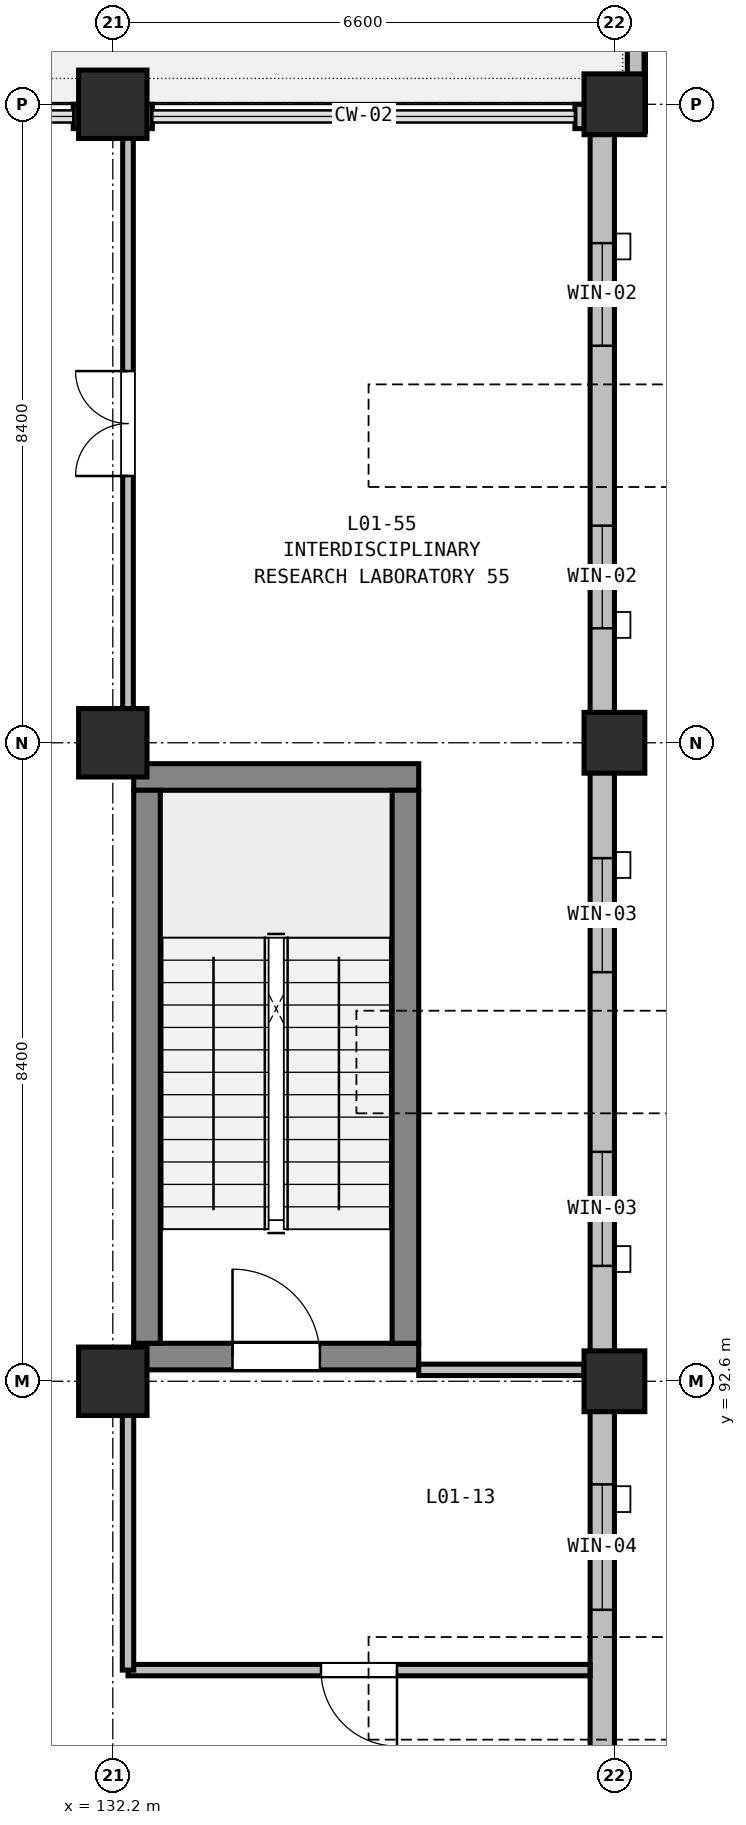
"""IFC4 building model, lengths in metres.
Left out: names, types, materials, properties, quantities, classifications, styles, units other than length and angle.
Written with IfcOpenShell. Run it as: python <this file> out.ifc"""

import sys

from ifc_helpers import new_model, si_unit, direction, frame, frame_2d, origin, origin_2d, place, context, subcontext, project, spatial, rectangle, extrude, element, fill, save


model = new_model("IFC4")
c1 = context("Model", 3, precision=1e-05, world=origin(), true_north=direction((0.0, 1.0)))
c2 = subcontext(c1, "Body", "Model", "MODEL_VIEW")
j1 = project(units=[si_unit("LENGTHUNIT", "METRE"), si_unit("PLANEANGLEUNIT", "RADIAN")], contexts=[c1])
p1 = place(None, origin())
s1 = spatial("IfcSite", under=j1, at=p1, CompositionType="ELEMENT")
p2 = place(p1, origin())
s2 = spatial("IfcBuilding", under=s1, at=p2, CompositionType="ELEMENT")
p3 = place(p2, frame((0.0, 0.0, 5.4)))
s3 = spatial("IfcBuildingStorey", under=s2, at=p3, CompositionType="ELEMENT", Elevation=5.4)
for number, where, z_axis, x_axis in (
    (1, (132.2, 92.6, 0.0), (0.0, 0.0, 1.0), (1.0, 0.0, 0.0)),
    (2, (132.2, 101.0, 0.0), (0.0, 0.0, 1.0), (1.0, 0.0, 0.0)),
    (3, (132.2, 109.4, 0.0), (0.0, 0.0, 1.0), (1.0, 0.0, 0.0)),
):
    element("IfcColumn", number, at=place(p3, frame(where, z_axis=z_axis, x_axis=x_axis)), inside=s3, PredefinedType="COLUMN", context=c2, shape_type="SweptSolid", body=[
        extrude(rectangle(XDim=0.9, YDim=0.9, at=origin_2d()), origin(), (0.0, 0.0, 1.0), 4.8),
    ])
for number, where, z_axis, x_axis in (
    (4, (138.8, 92.6, 0.0), (0.0, 0.0, 1.0), (1.0, 0.0, 0.0)),
    (5, (138.8, 101.0, 0.0), (0.0, 0.0, 1.0), (1.0, 0.0, 0.0)),
    (6, (138.8, 109.4, 0.0), (0.0, 0.0, 1.0), (1.0, 0.0, 0.0)),
):
    element("IfcColumn", number, at=place(p3, frame(where, z_axis=z_axis, x_axis=x_axis)), inside=s3, PredefinedType="COLUMN", context=c2, shape_type="SweptSolid", body=[
        extrude(rectangle(XDim=0.8, YDim=0.8, at=origin_2d()), origin(), (0.0, 0.0, 1.0), 4.8),
    ])
p4 = place(p3, frame((132.475, 92.925, 0.0), z_axis=(0.0, 0.0, 1.0), x_axis=(1.0, 0.0, 0.0)))
e7 = element("IfcWall", 7, at=p4, inside=s3, PredefinedType="SHEAR", context=c2, shape_type="SweptSolid", body=[
    extrude(rectangle(XDim=3.75, YDim=0.35, at=frame_2d((1.875, 0.0))), origin(), (0.0, 0.0, 1.0), 4.8),
])
p5 = place(p4, frame((1.3, 0.0, 0.0)))
e8 = element("IfcOpeningElement", 8, at=p5, cuts=e7, PredefinedType="OPENING", context=c2, shape_type="SweptSolid", body=[
    extrude(rectangle(XDim=1.15, YDim=2.15, at=frame_2d((0.575, 1.075))), frame((0.0, 0.185, 0.0), z_axis=(0.0, -1.0, 0.0), x_axis=(1.0, 0.0, 0.0)), (0.0, 0.0, 1.0), 0.37),
])
p6 = place(p3, frame((132.475, 100.55, 0.0), z_axis=(0.0, 0.0, 1.0), x_axis=(1.0, 0.0, 0.0)))
e9 = element("IfcWall", 9, at=p6, inside=s3, PredefinedType="SHEAR", context=c2, shape_type="SweptSolid", body=[
    extrude(rectangle(XDim=3.75, YDim=0.35, at=frame_2d((1.875, 0.0))), origin(), (0.0, 0.0, 1.0), 4.8),
])
for number, where, z_axis, x_axis in (
    (10, (132.65, 93.1, 0.0), (0.0, 0.0, 1.0), (0.0, 1.0, 0.0)),
    (11, (136.05, 93.1, 0.0), (0.0, 0.0, 1.0), (0.0, 1.0, 0.0)),
):
    element("IfcWall", number, at=place(p3, frame(where, z_axis=z_axis, x_axis=x_axis)), inside=s3, PredefinedType="SHEAR", context=c2, shape_type="SweptSolid", body=[
        extrude(rectangle(XDim=7.275, YDim=0.35, at=frame_2d((3.637, 0.0))), origin(), (0.0, 0.0, 1.0), 4.8),
    ])
for number, where, z_axis, x_axis in (
    (12, (131.68, 109.24, 0.0), (0.0, 0.0, 1.0), (1.0, 0.0, 0.0)),
    (13, (132.2, 109.24, 0.0), (0.0, 0.0, 1.0), (1.0, 0.0, 0.0)),
    (14, (138.28, 109.24, 0.0), (0.0, 0.0, 1.0), (1.0, 0.0, 0.0)),
):
    element("IfcWall", number, at=place(p3, frame(where, z_axis=z_axis, x_axis=x_axis)), inside=s3, PredefinedType="STANDARD", context=c2, shape_type="SweptSolid", body=[
        extrude(rectangle(XDim=0.52, YDim=0.32, at=frame_2d((0.26, 0.0))), origin(), (0.0, 0.0, 1.0), 3.385),
    ])
p7 = place(p3, frame((138.64, 109.08, 0.0), z_axis=(0.0, 0.0, 1.0), x_axis=(0.0, -1.0, 0.0)))
e15 = element("IfcWall", 15, at=p7, inside=s3, PredefinedType="STANDARD", context=c2, shape_type="SweptSolid", body=[
    extrude(rectangle(XDim=8.08, YDim=0.32, at=frame_2d((4.04, 0.0))), origin(), (0.0, 0.0, 1.0), 4.085),
])
p8 = place(p7, frame((1.507, 0.0, 0.9)))
e16 = element("IfcOpeningElement", 16, at=p8, cuts=e15, PredefinedType="OPENING", context=c2, shape_type="SweptSolid", body=[
    extrude(rectangle(XDim=1.35, YDim=2.1, at=frame_2d((0.675, 1.05))), frame((0.0, 0.17, 0.0), z_axis=(0.0, -1.0, 0.0), x_axis=(1.0, 0.0, 0.0)), (0.0, 0.0, 1.0), 0.34),
])
p9 = place(p7, frame((5.223, 0.0, 0.9)))
e17 = element("IfcOpeningElement", 17, at=p9, cuts=e15, PredefinedType="OPENING", context=c2, shape_type="SweptSolid", body=[
    extrude(rectangle(XDim=1.35, YDim=2.1, at=frame_2d((0.675, 1.05))), frame((0.0, 0.17, 0.0), z_axis=(0.0, -1.0, 0.0), x_axis=(1.0, 0.0, 0.0)), (0.0, 0.0, 1.0), 0.34),
])
p10 = place(p3, frame((138.64, 101.0, 0.0), z_axis=(0.0, 0.0, 1.0), x_axis=(0.0, -1.0, 0.0)))
e18 = element("IfcWall", 18, at=p10, inside=s3, PredefinedType="STANDARD", context=c2, shape_type="SweptSolid", body=[
    extrude(rectangle(XDim=8.4, YDim=0.32, at=frame_2d((4.2, 0.0))), origin(), (0.0, 0.0, 1.0), 4.085),
])
p11 = place(p10, frame((1.518, 0.0, 0.9)))
e19 = element("IfcOpeningElement", 19, at=p11, cuts=e18, PredefinedType="OPENING", context=c2, shape_type="SweptSolid", body=[
    extrude(rectangle(XDim=1.5, YDim=2.1, at=frame_2d((0.75, 1.05))), frame((0.0, 0.17, 0.0), z_axis=(0.0, -1.0, 0.0), x_axis=(1.0, 0.0, 0.0)), (0.0, 0.0, 1.0), 0.34),
])
p12 = place(p10, frame((5.382, 0.0, 0.9)))
e20 = element("IfcOpeningElement", 20, at=p12, cuts=e18, PredefinedType="OPENING", context=c2, shape_type="SweptSolid", body=[
    extrude(rectangle(XDim=1.5, YDim=2.1, at=frame_2d((0.75, 1.05))), frame((0.0, 0.17, 0.0), z_axis=(0.0, -1.0, 0.0), x_axis=(1.0, 0.0, 0.0)), (0.0, 0.0, 1.0), 0.34),
])
p13 = place(p3, frame((138.64, 92.6, 0.0), z_axis=(0.0, 0.0, 1.0), x_axis=(0.0, -1.0, 0.0)))
e21 = element("IfcWall", 21, at=p13, inside=s3, PredefinedType="STANDARD", context=c2, shape_type="SweptSolid", body=[
    extrude(rectangle(XDim=8.08, YDim=0.32, at=frame_2d((4.04, 0.0))), origin(), (0.0, 0.0, 1.0), 4.085),
])
p14 = place(p13, frame((1.357, 0.0, 0.9)))
e22 = element("IfcOpeningElement", 22, at=p14, cuts=e21, PredefinedType="OPENING", context=c2, shape_type="SweptSolid", body=[
    extrude(rectangle(XDim=1.65, YDim=2.1, at=frame_2d((0.825, 1.05))), frame((0.0, 0.17, 0.0), z_axis=(0.0, -1.0, 0.0), x_axis=(1.0, 0.0, 0.0)), (0.0, 0.0, 1.0), 0.34),
])
p15 = place(p13, frame((5.073, 0.0, 0.9)))
e23 = element("IfcOpeningElement", 23, at=p15, cuts=e21, PredefinedType="OPENING", context=c2, shape_type="SweptSolid", body=[
    extrude(rectangle(XDim=1.65, YDim=2.1, at=frame_2d((0.825, 1.05))), frame((0.0, 0.17, 0.0), z_axis=(0.0, -1.0, 0.0), x_axis=(1.0, 0.0, 0.0)), (0.0, 0.0, 1.0), 0.34),
])
p16 = place(p3, frame((139.08, 118.28, 0.0), z_axis=(0.0, 0.0, 1.0), x_axis=(0.0, -1.0, 0.0)))
e24 = element("IfcWall", 24, at=p16, inside=s3, PredefinedType="PARAPET", context=c2, shape_type="SweptSolid", body=[
    extrude(rectangle(XDim=9.11, YDim=0.22, at=frame_2d((4.555, 0.0))), origin(), (0.0, 0.0, 1.0), 0.68),
])
p17 = place(p3, frame((136.225, 92.75, 0.0), z_axis=(0.0, 0.0, 1.0), x_axis=(1.0, 0.0, 0.0)))
e25 = element("IfcWall", 25, at=p17, inside=s3, PredefinedType="PARTITIONING", context=c2, shape_type="SweptSolid", body=[
    extrude(rectangle(XDim=2.175, YDim=0.15, at=frame_2d((1.087, 0.0))), origin(), (0.0, 0.0, 1.0), 4.135),
])
p18 = place(p3, frame((138.478, 88.8, 0.0), z_axis=(0.0, 0.0, 1.0), x_axis=(-1.0, 0.0, 0.0)))
e26 = element("IfcWall", 26, at=p18, inside=s3, PredefinedType="PARTITIONING", context=c2, shape_type="SweptSolid", body=[
    extrude(rectangle(XDim=6.078, YDim=0.15, at=frame_2d((3.039, 0.0))), origin(), (0.0, 0.0, 1.0), 3.935),
])
p19 = place(p18, frame((2.539, 0.0, 0.0)))
e27 = element("IfcOpeningElement", 27, at=p19, cuts=e26, PredefinedType="OPENING", context=c2, shape_type="SweptSolid", body=[
    extrude(rectangle(XDim=1.0, YDim=2.1, at=frame_2d((0.5, 1.05))), frame((0.0, 0.085, 0.0), z_axis=(0.0, -1.0, 0.0), x_axis=(1.0, 0.0, 0.0)), (0.0, 0.0, 1.0), 0.17),
])
p20 = place(p3, frame((132.4, 88.8, 0.0), z_axis=(0.0, 0.0, 1.0), x_axis=(0.0, 1.0, 0.0)))
e28 = element("IfcWall", 28, at=p20, inside=s3, PredefinedType="PARTITIONING", context=c2, shape_type="SweptSolid", body=[
    extrude(rectangle(XDim=3.35, YDim=0.15, at=frame_2d((1.675, 0.0))), origin(), (0.0, 0.0, 1.0), 3.935),
])
p21 = place(p3, frame((132.4, 101.45, 0.0), z_axis=(0.0, 0.0, 1.0), x_axis=(0.0, 1.0, 0.0)))
e29 = element("IfcWall", 29, at=p21, inside=s3, PredefinedType="PARTITIONING", context=c2, shape_type="SweptSolid", body=[
    extrude(rectangle(XDim=7.5, YDim=0.14, at=frame_2d((3.75, 0.0))), origin(), (0.0, 0.0, 1.0), 3.935),
])
p22 = place(p21, frame((3.06, 0.0, 0.0)))
e30 = element("IfcOpeningElement", 30, at=p22, cuts=e29, PredefinedType="OPENING", context=c2, shape_type="SweptSolid", body=[
    extrude(rectangle(XDim=1.38, YDim=2.2, at=frame_2d((0.69, 1.1))), frame((0.0, 0.08, 0.0), z_axis=(0.0, -1.0, 0.0), x_axis=(1.0, 0.0, 0.0)), (0.0, 0.0, 1.0), 0.16),
])
p23 = place(p8, origin())
e31 = element("IfcWindow", 31, at=p23, inside=s3, PartitioningType="SINGLE_PANEL", PredefinedType="WINDOW", context=c2, shape_type="SweptSolid", body=[
    extrude(rectangle(XDim=1.35, YDim=2.1, at=frame_2d((0.675, 1.05))), frame((0.0, 0.03, 0.0), z_axis=(0.0, -1.0, 0.0), x_axis=(1.0, 0.0, 0.0)), (0.0, 0.0, 1.0), 0.06),
])
fill(e16, e31)
p24 = place(p9, origin())
e32 = element("IfcWindow", 32, at=p24, inside=s3, PartitioningType="SINGLE_PANEL", PredefinedType="WINDOW", context=c2, shape_type="SweptSolid", body=[
    extrude(rectangle(XDim=1.35, YDim=2.1, at=frame_2d((0.675, 1.05))), frame((0.0, 0.03, 0.0), z_axis=(0.0, -1.0, 0.0), x_axis=(1.0, 0.0, 0.0)), (0.0, 0.0, 1.0), 0.06),
])
fill(e17, e32)
p25 = place(p11, origin())
e33 = element("IfcWindow", 33, at=p25, inside=s3, PartitioningType="SINGLE_PANEL", PredefinedType="WINDOW", context=c2, shape_type="SweptSolid", body=[
    extrude(rectangle(XDim=1.5, YDim=2.1, at=frame_2d((0.75, 1.05))), frame((0.0, 0.03, 0.0), z_axis=(0.0, -1.0, 0.0), x_axis=(1.0, 0.0, 0.0)), (0.0, 0.0, 1.0), 0.06),
])
fill(e19, e33)
p26 = place(p12, origin())
e34 = element("IfcWindow", 34, at=p26, inside=s3, PartitioningType="SINGLE_PANEL", PredefinedType="WINDOW", context=c2, shape_type="SweptSolid", body=[
    extrude(rectangle(XDim=1.5, YDim=2.1, at=frame_2d((0.75, 1.05))), frame((0.0, 0.03, 0.0), z_axis=(0.0, -1.0, 0.0), x_axis=(1.0, 0.0, 0.0)), (0.0, 0.0, 1.0), 0.06),
])
fill(e20, e34)
p27 = place(p14, origin())
e35 = element("IfcWindow", 35, at=p27, inside=s3, PartitioningType="SINGLE_PANEL", PredefinedType="WINDOW", context=c2, shape_type="SweptSolid", body=[
    extrude(rectangle(XDim=1.65, YDim=2.1, at=frame_2d((0.825, 1.05))), frame((0.0, 0.03, 0.0), z_axis=(0.0, -1.0, 0.0), x_axis=(1.0, 0.0, 0.0)), (0.0, 0.0, 1.0), 0.06),
])
fill(e22, e35)
p28 = place(p5, origin())
e36 = element("IfcDoor", 36, at=p28, inside=s3, OperationType="SINGLE_SWING_LEFT", PredefinedType="DOOR", context=c2, shape_type="SweptSolid", body=[
    extrude(rectangle(XDim=1.15, YDim=2.15, at=frame_2d((0.575, 1.075))), frame((0.0, 0.025, 0.0), z_axis=(0.0, -1.0, 0.0), x_axis=(1.0, 0.0, 0.0)), (0.0, 0.0, 1.0), 0.05),
])
fill(e8, e36)
p29 = place(p19, origin())
e37 = element("IfcDoor", 37, at=p29, inside=s3, OperationType="SINGLE_SWING_LEFT", PredefinedType="DOOR", context=c2, shape_type="SweptSolid", body=[
    extrude(rectangle(XDim=1.0, YDim=2.1, at=frame_2d((0.5, 1.05))), frame((0.0, 0.025, 0.0), z_axis=(0.0, -1.0, 0.0), x_axis=(1.0, 0.0, 0.0)), (0.0, 0.0, 1.0), 0.05),
])
fill(e27, e37)
p30 = place(p22, origin())
e38 = element("IfcDoor", 38, at=p30, inside=s3, OperationType="DOUBLE_DOOR_SINGLE_SWING", PredefinedType="DOOR", context=c2, shape_type="SweptSolid", body=[
    extrude(rectangle(XDim=1.38, YDim=2.2, at=frame_2d((0.69, 1.1))), frame((0.0, 0.025, 0.0), z_axis=(0.0, -1.0, 0.0), x_axis=(1.0, 0.0, 0.0)), (0.0, 0.0, 1.0), 0.05),
])
fill(e30, e38)
save(model, sys.argv[1])
